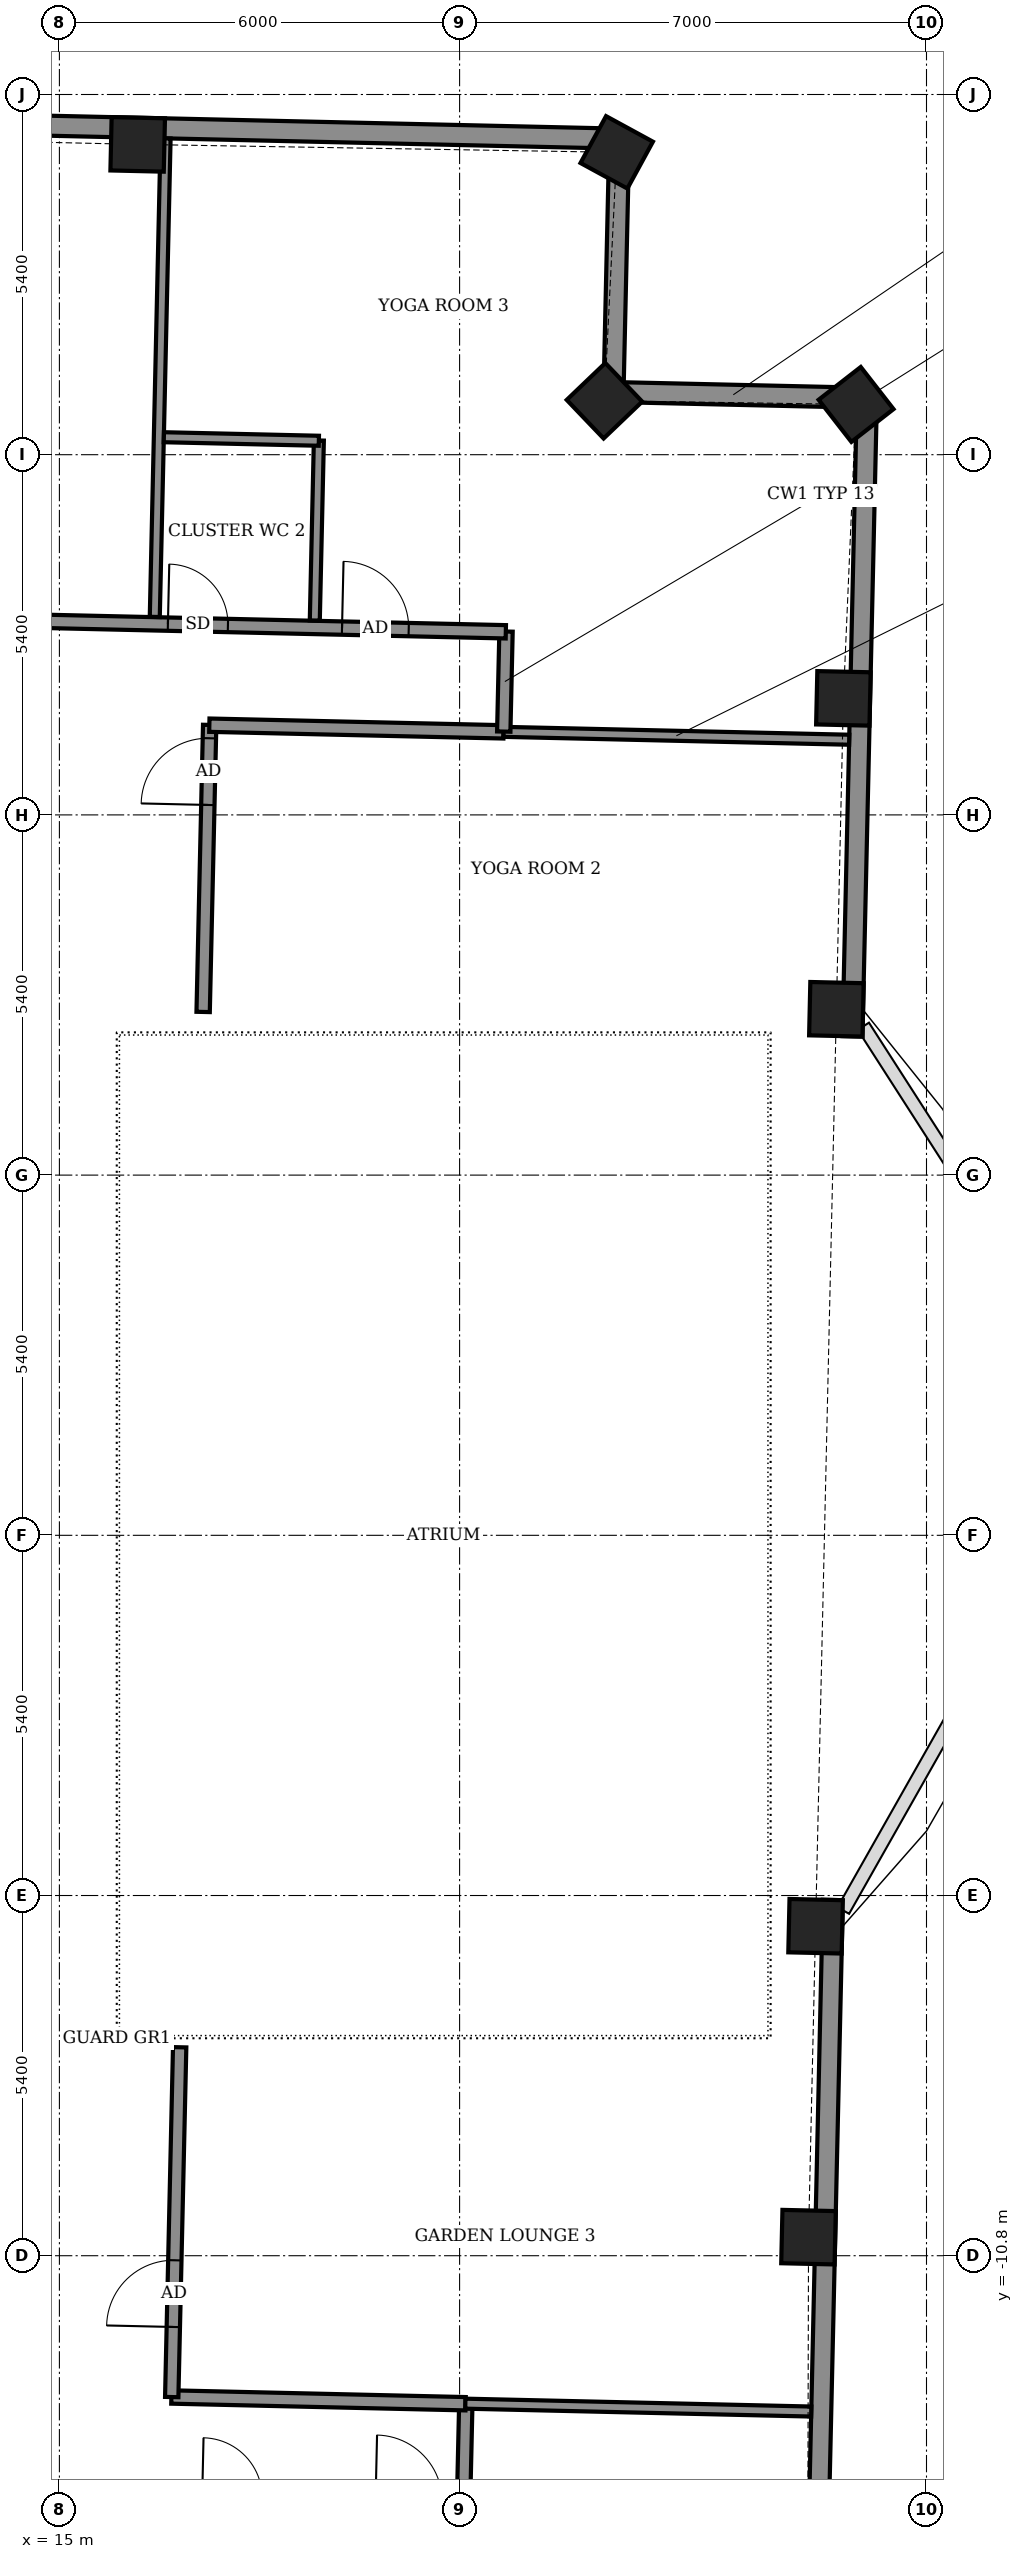
"""IFC4 building model, lengths in metres.
Left out: names, types, materials, properties, quantities, classifications, styles, units other than length and angle.
Written with IfcOpenShell. Run it as: python <this file> out.ifc"""

import sys

from ifc_helpers import new_model, si_unit, direction, frame, frame_2d, origin, origin_2d, place, context, subcontext, project, spatial, rectangle, extrude, element, fill, save


model = new_model("IFC4")
c1 = context("Model", 3, precision=1e-05, world=origin(), true_north=direction((0.0, 1.0)))
c2 = subcontext(c1, "Body", "Model", "MODEL_VIEW")
j1 = project(units=[si_unit("LENGTHUNIT", "METRE"), si_unit("PLANEANGLEUNIT", "RADIAN")], contexts=[c1])
p1 = place(None, origin())
s1 = spatial("IfcSite", under=j1, at=p1, CompositionType="ELEMENT")
p2 = place(p1, origin())
s2 = spatial("IfcBuilding", under=s1, at=p2, CompositionType="ELEMENT")
p3 = place(p2, frame((0.0, 0.0, 342.5)))
s3 = spatial("IfcBuildingStorey", under=s2, at=p3, CompositionType="ELEMENT", Elevation=342.5)
for number, where, z_axis, x_axis in (
    (1, (26.231, -10.522, -0.55), (0.0, 0.0, 1.0), (0.023, 1.0, 0.0)),
    (2, (26.337, -5.861, -0.55), (0.0, 0.0, 1.0), (0.023, 1.0, 0.0)),
    (3, (26.649, 7.886, -0.55), (0.0, 0.0, 1.0), (0.023, 1.0, 0.0)),
    (4, (26.754, 12.547, -0.55), (0.0, 0.0, 1.0), (0.023, 1.0, 0.0)),
    (5, (26.944, 16.953, -0.55), (0.0, 0.0, 1.0), (-0.614, 0.789, 0.0)),
    (6, (23.172, 17.009, -0.55), (0.0, 0.0, 1.0), (-0.691, 0.723, 0.0)),
    (7, (23.355, 20.733, -0.55), (0.0, 0.0, 1.0), (-0.878, 0.479, 0.0)),
    (8, (16.174, 20.852, -0.55), (0.0, 0.0, 1.0), (-1.0, 0.023, 0.0)),
):
    element("IfcColumn", number, at=place(p3, frame(where, z_axis=z_axis, x_axis=x_axis)), inside=s3, PredefinedType="COLUMN", context=c2, shape_type="SweptSolid", body=[
        extrude(rectangle(XDim=0.8, YDim=0.8, at=origin_2d()), origin(), (0.0, 0.0, 1.0), 3.6),
    ])
p4 = place(p3, frame((26.379, -15.039, 0.0), z_axis=(0.0, 0.0, 1.0), x_axis=(0.022668695782, 0.9997430321, 0.0)))
e9 = element("IfcWall", 9, at=p4, inside=s3, PredefinedType="SOLIDWALL", context=c2, shape_type="SweptSolid", body=[
    extrude(rectangle(XDim=9.574, YDim=0.3, at=frame_2d((4.787, 0.0))), origin(), (0.0, 0.0, 1.0), 2.55),
])
p5 = place(p3, frame((26.89, 7.48, 0.0), z_axis=(0.0, 0.0, 1.0), x_axis=(0.022666384487, 0.999743084504, 0.0)))
e10 = element("IfcWall", 10, at=p5, inside=s3, PredefinedType="SOLIDWALL", context=c2, shape_type="SweptSolid", body=[
    extrude(rectangle(XDim=9.575, YDim=0.3, at=frame_2d((4.788, 0.0))), origin(), (0.0, 0.0, 1.0), 2.55),
])
p6 = place(p3, frame((27.107, 17.053, 0.0), z_axis=(0.0, 0.0, 1.0), x_axis=(-0.999741835545, 0.022721405353, 0.0)))
e11 = element("IfcWall", 11, at=p6, inside=s3, PredefinedType="SOLIDWALL", context=c2, shape_type="SweptSolid", body=[
    extrude(rectangle(XDim=4.008, YDim=0.3, at=frame_2d((2.004, 0.0))), origin(), (0.0, 0.0, 1.0), 2.55),
])
p7 = place(p3, frame((23.308, 17.139, 0.0), z_axis=(0.0, 0.0, 1.0), x_axis=(0.022614868993, 0.999744251146, 0.0)))
e12 = element("IfcWall", 12, at=p7, inside=s3, PredefinedType="SOLIDWALL", context=c2, shape_type="SweptSolid", body=[
    extrude(rectangle(XDim=3.8, YDim=0.3, at=frame_2d((1.9, 0.0))), origin(), (0.0, 0.0, 1.0), 2.55),
])
p8 = place(p3, frame((23.394, 20.938, 0.0), z_axis=(0.0, 0.0, 1.0), x_axis=(-0.99974255281, 0.02268982375, 0.0)))
e13 = element("IfcWall", 13, at=p8, inside=s3, PredefinedType="SOLIDWALL", context=c2, shape_type="SweptSolid", body=[
    extrude(rectangle(XDim=43.9, YDim=0.3, at=frame_2d((21.95, 0.0))), origin(), (0.0, 0.0, 1.0), 2.5),
])
p9 = place(p3, frame((-19.768, -13.592, 0.0), z_axis=(0.0, 0.0, 1.0), x_axis=(0.999742831561, -0.02267753826, 0.0)))
e14 = element("IfcWall", 14, at=p9, inside=s3, PredefinedType="PARTITIONING", context=c2, shape_type="SweptSolid", body=[
    extrude(rectangle(XDim=40.834, YDim=0.2, at=frame_2d((20.417, 0.0))), origin(), (0.0, 0.0, 1.0), 3.05),
])
p10 = place(p9, frame((0.2, 0.0, 0.0)))
e15 = element("IfcOpeningElement", 15, at=p10, cuts=e14, PredefinedType="OPENING", context=c2, shape_type="SweptSolid", body=[
    extrude(rectangle(XDim=1.0, YDim=2.1, at=frame_2d((0.5, 1.05))), frame((0.0, 0.11, 0.0), z_axis=(0.0, -1.0, 0.0), x_axis=(1.0, 0.0, 0.0)), (0.0, 0.0, 1.0), 0.22),
])
p11 = place(p9, frame((6.668, 0.0, 0.0)))
e16 = element("IfcOpeningElement", 16, at=p11, cuts=e14, PredefinedType="OPENING", context=c2, shape_type="SweptSolid", body=[
    extrude(rectangle(XDim=1.0, YDim=2.1, at=frame_2d((0.5, 1.05))), frame((0.0, 0.11, 0.0), z_axis=(0.0, -1.0, 0.0), x_axis=(1.0, 0.0, 0.0)), (0.0, 0.0, 1.0), 0.22),
])
p12 = place(p9, frame((4.068, 0.0, 0.0)))
e17 = element("IfcOpeningElement", 17, at=p12, cuts=e14, PredefinedType="OPENING", context=c2, shape_type="SweptSolid", body=[
    extrude(rectangle(XDim=0.9, YDim=2.1, at=frame_2d((0.45, 1.05))), frame((0.0, 0.11, 0.0), z_axis=(0.0, -1.0, 0.0), x_axis=(1.0, 0.0, 0.0)), (0.0, 0.0, 1.0), 0.22),
])
p13 = place(p9, frame((8.936, 0.0, 0.0)))
e18 = element("IfcOpeningElement", 18, at=p13, cuts=e14, PredefinedType="OPENING", context=c2, shape_type="SweptSolid", body=[
    extrude(rectangle(XDim=1.0, YDim=2.1, at=frame_2d((0.5, 1.05))), frame((0.0, 0.11, 0.0), z_axis=(0.0, -1.0, 0.0), x_axis=(1.0, 0.0, 0.0)), (0.0, 0.0, 1.0), 0.22),
])
p14 = place(p9, frame((13.918, 0.0, 0.0)))
e19 = element("IfcOpeningElement", 19, at=p14, cuts=e14, PredefinedType="OPENING", context=c2, shape_type="SweptSolid", body=[
    extrude(rectangle(XDim=0.9, YDim=2.1, at=frame_2d((0.45, 1.05))), frame((0.0, 0.11, 0.0), z_axis=(0.0, -1.0, 0.0), x_axis=(1.0, 0.0, 0.0)), (0.0, 0.0, 1.0), 0.22),
])
p15 = place(p9, frame((19.118, 0.0, 0.0)))
e20 = element("IfcOpeningElement", 20, at=p15, cuts=e14, PredefinedType="OPENING", context=c2, shape_type="SweptSolid", body=[
    extrude(rectangle(XDim=1.0, YDim=2.1, at=frame_2d((0.5, 1.05))), frame((0.0, 0.11, 0.0), z_axis=(0.0, -1.0, 0.0), x_axis=(1.0, 0.0, 0.0)), (0.0, 0.0, 1.0), 0.22),
])
p16 = place(p9, frame((16.518, 0.0, 0.0)))
e21 = element("IfcOpeningElement", 21, at=p16, cuts=e14, PredefinedType="OPENING", context=c2, shape_type="SweptSolid", body=[
    extrude(rectangle(XDim=0.9, YDim=2.1, at=frame_2d((0.45, 1.05))), frame((0.0, 0.11, 0.0), z_axis=(0.0, -1.0, 0.0), x_axis=(1.0, 0.0, 0.0)), (0.0, 0.0, 1.0), 0.22),
])
p17 = place(p9, frame((23.066, 0.0, 0.0)))
e22 = element("IfcOpeningElement", 22, at=p17, cuts=e14, PredefinedType="OPENING", context=c2, shape_type="SweptSolid", body=[
    extrude(rectangle(XDim=1.0, YDim=2.1, at=frame_2d((0.5, 1.05))), frame((0.0, 0.11, 0.0), z_axis=(0.0, -1.0, 0.0), x_axis=(1.0, 0.0, 0.0)), (0.0, 0.0, 1.0), 0.22),
])
p18 = place(p9, frame((31.618, 0.0, 0.0)))
e23 = element("IfcOpeningElement", 23, at=p18, cuts=e14, PredefinedType="OPENING", context=c2, shape_type="SweptSolid", body=[
    extrude(rectangle(XDim=1.0, YDim=2.1, at=frame_2d((0.5, 1.05))), frame((0.0, 0.11, 0.0), z_axis=(0.0, -1.0, 0.0), x_axis=(1.0, 0.0, 0.0)), (0.0, 0.0, 1.0), 0.22),
])
p19 = place(p9, frame((29.218, 0.0, 0.0)))
e24 = element("IfcOpeningElement", 24, at=p19, cuts=e14, PredefinedType="OPENING", context=c2, shape_type="SweptSolid", body=[
    extrude(rectangle(XDim=0.9, YDim=2.1, at=frame_2d((0.45, 1.05))), frame((0.0, 0.11, 0.0), z_axis=(0.0, -1.0, 0.0), x_axis=(1.0, 0.0, 0.0)), (0.0, 0.0, 1.0), 0.22),
])
p20 = place(p9, frame((39.518, 0.0, 0.0)))
e25 = element("IfcOpeningElement", 25, at=p20, cuts=e14, PredefinedType="OPENING", context=c2, shape_type="SweptSolid", body=[
    extrude(rectangle(XDim=1.0, YDim=2.1, at=frame_2d((0.5, 1.05))), frame((0.0, 0.11, 0.0), z_axis=(0.0, -1.0, 0.0), x_axis=(1.0, 0.0, 0.0)), (0.0, 0.0, 1.0), 0.22),
])
p21 = place(p9, frame((36.918, 0.0, 0.0)))
e26 = element("IfcOpeningElement", 26, at=p21, cuts=e14, PredefinedType="OPENING", context=c2, shape_type="SweptSolid", body=[
    extrude(rectangle(XDim=0.9, YDim=2.1, at=frame_2d((0.45, 1.05))), frame((0.0, 0.11, 0.0), z_axis=(0.0, -1.0, 0.0), x_axis=(1.0, 0.0, 0.0)), (0.0, 0.0, 1.0), 0.22),
])
p22 = place(p3, frame((21.059, -14.518, 0.0), z_axis=(0.0, 0.0, 1.0), x_axis=(0.022632637625, 0.99974384905, 0.0)))
e27 = element("IfcWall", 27, at=p22, inside=s3, PredefinedType="PARTITIONING", context=c2, shape_type="SweptSolid", body=[
    extrude(rectangle(XDim=1.5, YDim=0.2, at=frame_2d((0.75, 0.0))), origin(), (0.0, 0.0, 1.0), 3.05),
])
p23 = place(p3, frame((16.679, -12.918, 0.0), z_axis=(0.0, 0.0, 1.0), x_axis=(0.999737590501, -0.022907425419, 0.0)))
e28 = element("IfcWall", 28, at=p23, inside=s3, PredefinedType="PARTITIONING", context=c2, shape_type="SweptSolid", body=[
    extrude(rectangle(XDim=4.412, YDim=0.2, at=frame_2d((2.206, 0.0))), origin(), (0.0, 0.0, 1.0), 3.05),
])
p24 = place(p3, frame((16.684, -12.919, 0.0), z_axis=(0.0, 0.0, 1.0), x_axis=(0.022667483124, 0.999743059595, 0.0)))
e29 = element("IfcWall", 29, at=p24, inside=s3, PredefinedType="PARTITIONING", context=c2, shape_type="SweptSolid", body=[
    extrude(rectangle(XDim=5.245, YDim=0.2, at=frame_2d((2.623, 0.0))), origin(), (0.0, 0.0, 1.0), 3.05),
])
p25 = place(p24, frame((1.051, 0.0, 0.0)))
e30 = element("IfcOpeningElement", 30, at=p25, cuts=e29, PredefinedType="OPENING", context=c2, shape_type="SweptSolid", body=[
    extrude(rectangle(XDim=1.0, YDim=2.1, at=frame_2d((0.5, 1.05))), frame((0.0, 0.11, 0.0), z_axis=(0.0, -1.0, 0.0), x_axis=(1.0, 0.0, 0.0)), (0.0, 0.0, 1.0), 0.22),
])
p26 = place(p3, frame((21.086, -13.018, 0.0), z_axis=(0.0, 0.0, 1.0), x_axis=(0.999741592512, -0.02273209628, 0.0)))
e31 = element("IfcWall", 31, at=p26, inside=s3, PredefinedType="PARTITIONING", context=c2, shape_type="SweptSolid", body=[
    extrude(rectangle(XDim=5.187, YDim=0.15, at=frame_2d((2.594, 0.0))), origin(), (0.0, 0.0, 1.0), 2.55),
])
p27 = place(p3, frame((17.155, 7.846, 0.0), z_axis=(0.0, 0.0, 1.0), x_axis=(0.022745886685, 0.999741278851, 0.0)))
e32 = element("IfcWall", 32, at=p27, inside=s3, PredefinedType="PARTITIONING", context=c2, shape_type="SweptSolid", body=[
    extrude(rectangle(XDim=4.304, YDim=0.2, at=frame_2d((2.152, 0.0))), origin(), (0.0, 0.0, 1.0), 3.05),
])
p28 = place(p27, frame((3.104, 0.0, 0.0)))
e33 = element("IfcOpeningElement", 33, at=p28, cuts=e32, PredefinedType="OPENING", context=c2, shape_type="SweptSolid", body=[
    extrude(rectangle(XDim=1.0, YDim=2.1, at=frame_2d((0.5, 1.05))), frame((0.0, 0.11, 0.0), z_axis=(0.0, -1.0, 0.0), x_axis=(1.0, 0.0, 0.0)), (0.0, 0.0, 1.0), 0.22),
])
p29 = place(p3, frame((17.248, 12.145, 0.0), z_axis=(0.0, 0.0, 1.0), x_axis=(0.999742606292, -0.022687467127, 0.0)))
e34 = element("IfcWall", 34, at=p29, inside=s3, PredefinedType="PARTITIONING", context=c2, shape_type="SweptSolid", body=[
    extrude(rectangle(XDim=4.412, YDim=0.2, at=frame_2d((2.206, 0.0))), origin(), (0.0, 0.0, 1.0), 3.05),
])
p30 = place(p3, frame((21.659, 12.045, 0.0), z_axis=(0.0, 0.0, 1.0), x_axis=(0.999741202945, -0.0227492227, 0.0)))
e35 = element("IfcWall", 35, at=p30, inside=s3, PredefinedType="PARTITIONING", context=c2, shape_type="SweptSolid", body=[
    extrude(rectangle(XDim=5.183, YDim=0.15, at=frame_2d((2.592, 0.0))), origin(), (0.0, 0.0, 1.0), 2.55),
])
p31 = place(p3, frame((21.662, 12.049, 0.0), z_axis=(0.0, 0.0, 1.0), x_axis=(0.022617910375, 0.999744182344, 0.0)))
e36 = element("IfcWall", 36, at=p31, inside=s3, PredefinedType="PARTITIONING", context=c2, shape_type="SweptSolid", body=[
    extrude(rectangle(XDim=1.5, YDim=0.2, at=frame_2d((0.75, 0.0))), origin(), (0.0, 0.0, 1.0), 3.05),
])
p32 = place(p3, frame((-19.132, 14.471, 0.0), z_axis=(0.0, 0.0, 1.0), x_axis=(0.999742846934, -0.022676860534, 0.0)))
e37 = element("IfcWall", 37, at=p32, inside=s3, PredefinedType="PARTITIONING", context=c2, shape_type="SweptSolid", body=[
    extrude(rectangle(XDim=40.836, YDim=0.2, at=frame_2d((20.418, 0.0))), origin(), (0.0, 0.0, 1.0), 3.05),
])
p33 = place(p32, frame((38.379, 0.0, 0.0)))
e38 = element("IfcOpeningElement", 38, at=p33, cuts=e37, PredefinedType="OPENING", context=c2, shape_type="SweptSolid", body=[
    extrude(rectangle(XDim=1.0, YDim=2.1, at=frame_2d((0.5, 1.05))), frame((0.0, 0.11, 0.0), z_axis=(0.0, -1.0, 0.0), x_axis=(1.0, 0.0, 0.0)), (0.0, 0.0, 1.0), 0.22),
])
p34 = place(p32, frame((35.768, 0.0, 0.0)))
e39 = element("IfcOpeningElement", 39, at=p34, cuts=e37, PredefinedType="OPENING", context=c2, shape_type="SweptSolid", body=[
    extrude(rectangle(XDim=0.9, YDim=2.1, at=frame_2d((0.45, 1.05))), frame((0.0, 0.11, 0.0), z_axis=(0.0, -1.0, 0.0), x_axis=(1.0, 0.0, 0.0)), (0.0, 0.0, 1.0), 0.22),
])
p35 = place(p32, frame((31.451, 0.0, 0.0)))
e40 = element("IfcOpeningElement", 40, at=p35, cuts=e37, PredefinedType="OPENING", context=c2, shape_type="SweptSolid", body=[
    extrude(rectangle(XDim=1.0, YDim=2.1, at=frame_2d((0.5, 1.05))), frame((0.0, 0.11, 0.0), z_axis=(0.0, -1.0, 0.0), x_axis=(1.0, 0.0, 0.0)), (0.0, 0.0, 1.0), 0.22),
])
p36 = place(p32, frame((28.868, 0.0, 0.0)))
e41 = element("IfcOpeningElement", 41, at=p36, cuts=e37, PredefinedType="OPENING", context=c2, shape_type="SweptSolid", body=[
    extrude(rectangle(XDim=0.9, YDim=2.1, at=frame_2d((0.45, 1.05))), frame((0.0, 0.11, 0.0), z_axis=(0.0, -1.0, 0.0), x_axis=(1.0, 0.0, 0.0)), (0.0, 0.0, 1.0), 0.22),
])
p37 = place(p32, frame((24.743, 0.0, 0.0)))
e42 = element("IfcOpeningElement", 42, at=p37, cuts=e37, PredefinedType="OPENING", context=c2, shape_type="SweptSolid", body=[
    extrude(rectangle(XDim=1.0, YDim=2.1, at=frame_2d((0.5, 1.05))), frame((0.0, 0.11, 0.0), z_axis=(0.0, -1.0, 0.0), x_axis=(1.0, 0.0, 0.0)), (0.0, 0.0, 1.0), 0.22),
])
p38 = place(p32, frame((19.119, 0.0, 0.0)))
e43 = element("IfcOpeningElement", 43, at=p38, cuts=e37, PredefinedType="OPENING", context=c2, shape_type="SweptSolid", body=[
    extrude(rectangle(XDim=1.0, YDim=2.1, at=frame_2d((0.5, 1.05))), frame((0.0, 0.11, 0.0), z_axis=(0.0, -1.0, 0.0), x_axis=(1.0, 0.0, 0.0)), (0.0, 0.0, 1.0), 0.22),
])
p39 = place(p32, frame((10.681, 0.0, 0.0)))
e44 = element("IfcOpeningElement", 44, at=p39, cuts=e37, PredefinedType="OPENING", context=c2, shape_type="SweptSolid", body=[
    extrude(rectangle(XDim=1.0, YDim=2.1, at=frame_2d((0.5, 1.05))), frame((0.0, 0.11, 0.0), z_axis=(0.0, -1.0, 0.0), x_axis=(1.0, 0.0, 0.0)), (0.0, 0.0, 1.0), 0.22),
])
p40 = place(p32, frame((15.318, 0.0, 0.0)))
e45 = element("IfcOpeningElement", 45, at=p40, cuts=e37, PredefinedType="OPENING", context=c2, shape_type="SweptSolid", body=[
    extrude(rectangle(XDim=0.9, YDim=2.1, at=frame_2d((0.45, 1.05))), frame((0.0, 0.11, 0.0), z_axis=(0.0, -1.0, 0.0), x_axis=(1.0, 0.0, 0.0)), (0.0, 0.0, 1.0), 0.22),
])
p41 = place(p32, frame((6.868, 0.0, 0.0)))
e46 = element("IfcOpeningElement", 46, at=p41, cuts=e37, PredefinedType="OPENING", context=c2, shape_type="SweptSolid", body=[
    extrude(rectangle(XDim=1.0, YDim=2.1, at=frame_2d((0.5, 1.05))), frame((0.0, 0.11, 0.0), z_axis=(0.0, -1.0, 0.0), x_axis=(1.0, 0.0, 0.0)), (0.0, 0.0, 1.0), 0.22),
])
p42 = place(p32, frame((4.268, 0.0, 0.0)))
e47 = element("IfcOpeningElement", 47, at=p42, cuts=e37, PredefinedType="OPENING", context=c2, shape_type="SweptSolid", body=[
    extrude(rectangle(XDim=0.9, YDim=2.1, at=frame_2d((0.45, 1.05))), frame((0.0, 0.11, 0.0), z_axis=(0.0, -1.0, 0.0), x_axis=(1.0, 0.0, 0.0)), (0.0, 0.0, 1.0), 0.22),
])
p43 = place(p32, frame((0.2, 0.0, 0.0)))
e48 = element("IfcOpeningElement", 48, at=p43, cuts=e37, PredefinedType="OPENING", context=c2, shape_type="SweptSolid", body=[
    extrude(rectangle(XDim=1.0, YDim=2.1, at=frame_2d((0.5, 1.05))), frame((0.0, 0.11, 0.0), z_axis=(0.0, -1.0, 0.0), x_axis=(1.0, 0.0, 0.0)), (0.0, 0.0, 1.0), 0.22),
])
p44 = place(p32, frame((1.668, 0.0, 0.0)))
e49 = element("IfcOpeningElement", 49, at=p44, cuts=e37, PredefinedType="OPENING", context=c2, shape_type="SweptSolid", body=[
    extrude(rectangle(XDim=0.9, YDim=2.1, at=frame_2d((0.45, 1.05))), frame((0.0, 0.11, 0.0), z_axis=(0.0, -1.0, 0.0), x_axis=(1.0, 0.0, 0.0)), (0.0, 0.0, 1.0), 0.22),
])
p45 = place(p3, frame((16.43, 13.768, 0.0), z_axis=(0.0, 0.0, 1.0), x_axis=(0.022591564546, 0.999744778037, 0.0)))
e50 = element("IfcWall", 50, at=p45, inside=s3, PredefinedType="PARTITIONING", context=c2, shape_type="SweptSolid", body=[
    extrude(rectangle(XDim=7.176, YDim=0.15, at=frame_2d((3.588, 0.0))), origin(), (0.0, 0.0, 1.0), 2.5),
])
p46 = place(p3, frame((18.829, 13.714, 0.0), z_axis=(0.0, 0.0, 1.0), x_axis=(0.022518033722, 0.999746436932, 0.0)))
e51 = element("IfcWall", 51, at=p46, inside=s3, PredefinedType="PARTITIONING", context=c2, shape_type="SweptSolid", body=[
    extrude(rectangle(XDim=2.7, YDim=0.15, at=frame_2d((1.35, 0.0))), origin(), (0.0, 0.0, 1.0), 3.05),
])
p47 = place(p3, frame((16.566, 16.462, 0.0), z_axis=(0.0, 0.0, 1.0), x_axis=(0.999740260747, -0.02279059109, 0.0)))
e52 = element("IfcWall", 52, at=p47, inside=s3, PredefinedType="PARTITIONING", context=c2, shape_type="SweptSolid", body=[
    extrude(rectangle(XDim=2.324, YDim=0.15, at=frame_2d((1.162, 0.0))), origin(), (0.0, 0.0, 1.0), 3.05),
])
p48 = place(p25, origin())
e53 = element("IfcDoor", 53, at=p48, inside=s3, OperationType="SINGLE_SWING_RIGHT", PredefinedType="DOOR", context=c2, shape_type="SweptSolid", body=[
    extrude(rectangle(XDim=1.0, YDim=2.1, at=frame_2d((0.5, 1.05))), frame((0.0, 0.025, 0.0), z_axis=(0.0, -1.0, 0.0), x_axis=(1.0, 0.0, 0.0)), (0.0, 0.0, 1.0), 0.05),
])
fill(e30, e53)
p49 = place(p28, origin())
e54 = element("IfcDoor", 54, at=p49, inside=s3, OperationType="SINGLE_SWING_LEFT", PredefinedType="DOOR", context=c2, shape_type="SweptSolid", body=[
    extrude(rectangle(XDim=1.0, YDim=2.1, at=frame_2d((0.5, 1.05))), frame((0.0, 0.025, 0.0), z_axis=(0.0, -1.0, 0.0), x_axis=(1.0, 0.0, 0.0)), (0.0, 0.0, 1.0), 0.05),
])
fill(e33, e54)
p50 = place(p33, origin())
e55 = element("IfcDoor", 55, at=p50, inside=s3, OperationType="SINGLE_SWING_RIGHT", PredefinedType="DOOR", context=c2, shape_type="SweptSolid", body=[
    extrude(rectangle(XDim=1.0, YDim=2.1, at=frame_2d((0.5, 1.05))), frame((0.0, 0.025, 0.0), z_axis=(0.0, -1.0, 0.0), x_axis=(1.0, 0.0, 0.0)), (0.0, 0.0, 1.0), 0.05),
])
fill(e38, e55)
p51 = place(p34, origin())
e56 = element("IfcDoor", 56, at=p51, inside=s3, OperationType="SINGLE_SWING_RIGHT", PredefinedType="DOOR", context=c2, shape_type="SweptSolid", body=[
    extrude(rectangle(XDim=0.9, YDim=2.1, at=frame_2d((0.45, 1.05))), frame((0.0, 0.025, 0.0), z_axis=(0.0, -1.0, 0.0), x_axis=(1.0, 0.0, 0.0)), (0.0, 0.0, 1.0), 0.05),
])
fill(e39, e56)
save(model, sys.argv[1])
